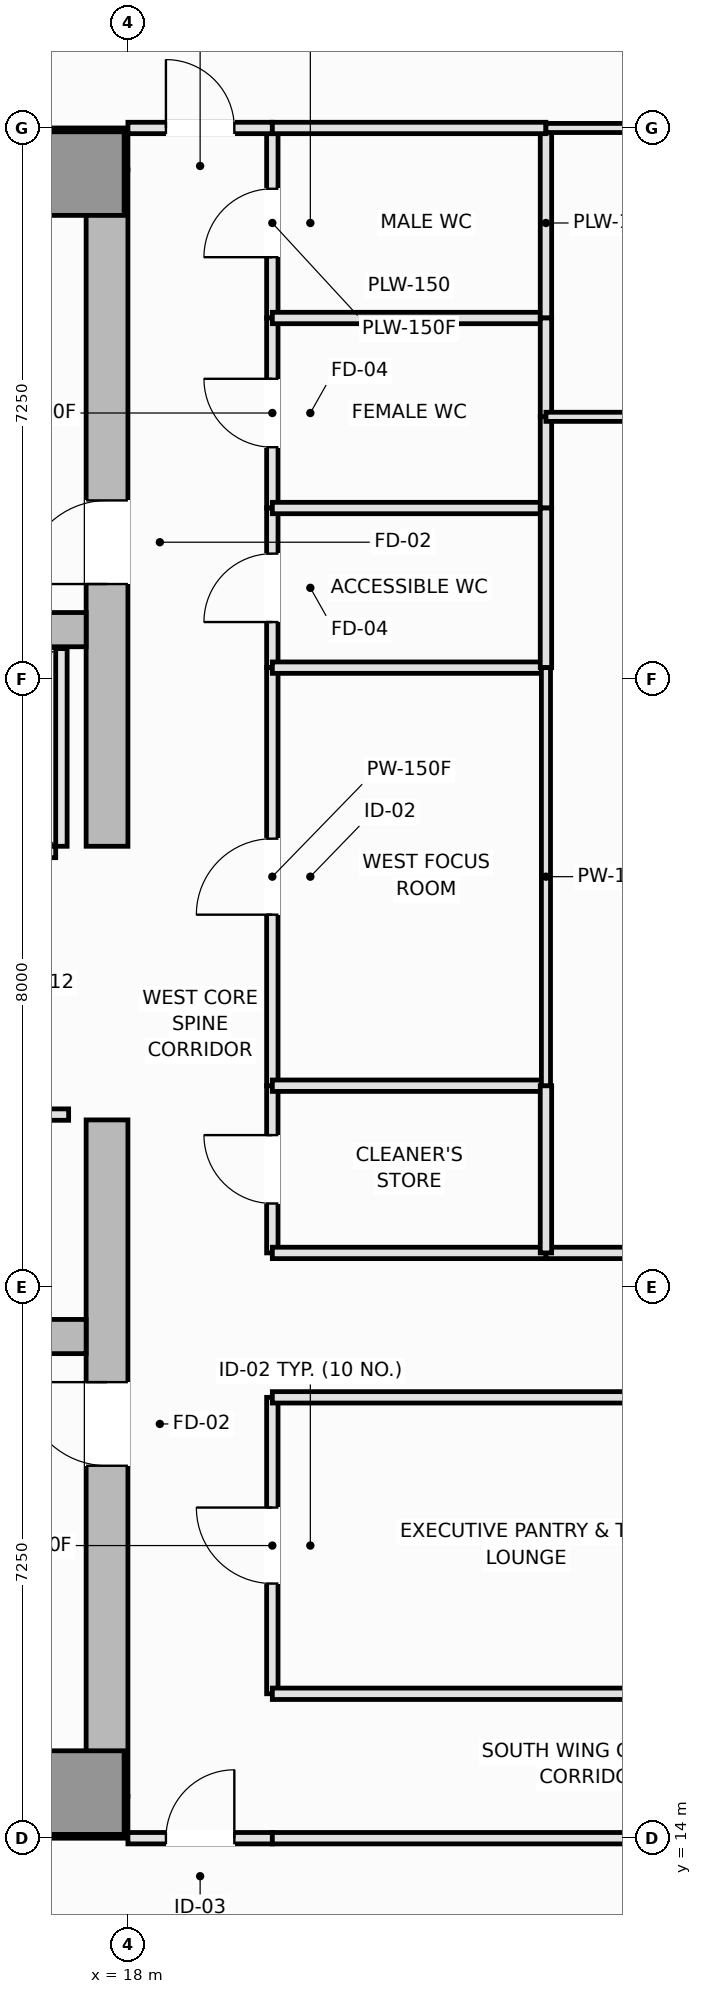
"""IFC4 building model, lengths in metres.
Left out: names, types, materials, properties, quantities, classifications, styles, units other than length and angle.
Written with IfcOpenShell. Run it as: python <this file> out.ifc"""

import sys

from ifc_helpers import new_model, si_unit, direction, frame, frame_2d, origin, origin_2d, place, context, subcontext, project, spatial, rectangle, extrude, element, fill, save


model = new_model("IFC4")
c1 = context("Model", 3, precision=1e-05, world=origin(), true_north=direction((0.0, 1.0)))
c2 = subcontext(c1, "Body", "Model", "MODEL_VIEW")
j1 = project(units=[si_unit("LENGTHUNIT", "METRE"), si_unit("PLANEANGLEUNIT", "RADIAN")], contexts=[c1])
p1 = place(None, origin())
s1 = spatial("IfcSite", under=j1, at=p1, CompositionType="ELEMENT")
p2 = place(p1, origin())
s2 = spatial("IfcBuilding", under=s1, at=p2, CompositionType="ELEMENT")
p3 = place(p2, frame((0.0, 0.0, 223.55)))
s3 = spatial("IfcBuildingStorey", under=s2, at=p3, CompositionType="ELEMENT", Elevation=223.55)
for number, where, z_axis, x_axis in (
    (1, (4.5, 14.275, 0.0), (0.0, 0.0, 1.0), (1.0, 0.0, 0.0)),
    (2, (4.5, 36.225, 0.0), (0.0, 0.0, 1.0), (1.0, 0.0, 0.0)),
):
    element("IfcWall", number, at=place(p3, frame(where, z_axis=z_axis, x_axis=x_axis)), inside=s3, PredefinedType="SHEAR", context=c2, shape_type="SweptSolid", body=[
        extrude(rectangle(XDim=13.5, YDim=0.55, at=frame_2d((6.75, 0.0))), origin(), (0.0, 0.0, 1.0), 3.55),
    ])
p4 = place(p3, frame((17.725, 14.55, 0.0), z_axis=(0.0, 0.0, 1.0), x_axis=(0.0, 1.0, 0.0)))
e3 = element("IfcWall", 3, at=p4, inside=s3, PredefinedType="SHEAR", context=c2, shape_type="SweptSolid", body=[
    extrude(rectangle(XDim=8.9, YDim=0.55, at=frame_2d((4.45, 0.0))), origin(), (0.0, 0.0, 1.0), 3.55),
])
p5 = place(p4, frame((4.35, 0.0, 0.0)))
e4 = element("IfcOpeningElement", 4, at=p5, cuts=e3, PredefinedType="OPENING", context=c2, shape_type="SweptSolid", body=[
    extrude(rectangle(XDim=1.1, YDim=2.15, at=frame_2d((0.55, 1.075))), frame((0.0, 0.285, 0.0), z_axis=(0.0, -1.0, 0.0), x_axis=(1.0, 0.0, 0.0)), (0.0, 0.0, 1.0), 0.57),
])
p6 = place(p3, frame((17.725, 27.05, 0.0), z_axis=(0.0, 0.0, 1.0), x_axis=(0.0, 1.0, 0.0)))
e5 = element("IfcWall", 5, at=p6, inside=s3, PredefinedType="SHEAR", context=c2, shape_type="SweptSolid", body=[
    extrude(rectangle(XDim=8.9, YDim=0.55, at=frame_2d((4.45, 0.0))), origin(), (0.0, 0.0, 1.0), 3.55),
])
p7 = place(p6, frame((3.45, 0.0, 0.0)))
e6 = element("IfcOpeningElement", 6, at=p7, cuts=e5, PredefinedType="OPENING", context=c2, shape_type="SweptSolid", body=[
    extrude(rectangle(XDim=1.1, YDim=2.15, at=frame_2d((0.55, 1.075))), frame((0.0, 0.285, 0.0), z_axis=(0.0, -1.0, 0.0), x_axis=(1.0, 0.0, 0.0)), (0.0, 0.0, 1.0), 0.57),
])
for number, where, z_axis, x_axis in (
    (7, (5.05, 20.6, 0.0), (0.0, 0.0, 1.0), (1.0, 0.0, 0.0)),
    (8, (5.05, 29.9, 0.0), (0.0, 0.0, 1.0), (1.0, 0.0, 0.0)),
):
    element("IfcWall", number, at=place(p3, frame(where, z_axis=z_axis, x_axis=x_axis)), inside=s3, PredefinedType="SHEAR", context=c2, shape_type="SweptSolid", body=[
        extrude(rectangle(XDim=12.4, YDim=0.45, at=frame_2d((6.2, 0.0))), origin(), (0.0, 0.0, 1.0), 3.55),
    ])
for number, where, z_axis, x_axis in (
    (9, (17.4, 14.6, 0.0), (0.0, 0.0, 1.0), (1.0, 0.0, 0.0)),
    (10, (17.4, 35.9, 0.0), (0.0, 0.0, 1.0), (1.0, 0.0, 0.0)),
):
    element("IfcColumn", number, at=place(p3, frame(where, z_axis=z_axis, x_axis=x_axis)), inside=s3, PredefinedType="PILASTER", context=c2, shape_type="SweptSolid", body=[
        extrude(rectangle(XDim=1.1, YDim=1.1, at=origin_2d()), origin(), (0.0, 0.0, 1.0), 3.55),
    ])
p8 = place(p3, frame((14.5, 26.975, 0.0), z_axis=(0.0, 0.0, 1.0), x_axis=(1.0, 0.0, 0.0)))
e11 = element("IfcWall", 11, at=p8, inside=s3, PredefinedType="PARTITIONING", context=c2, shape_type="SweptSolid", body=[
    extrude(rectangle(XDim=2.55, YDim=0.15, at=frame_2d((1.275, 0.0))), origin(), (0.0, 0.0, 1.0), 3.37),
])
p9 = place(p8, frame((0.625, 0.0, 0.0)))
e12 = element("IfcOpeningElement", 12, at=p9, cuts=e11, PredefinedType="OPENING", context=c2, shape_type="SweptSolid", body=[
    extrude(rectangle(XDim=1.3, YDim=2.2, at=frame_2d((0.65, 1.1))), frame((0.0, 0.085, 0.0), z_axis=(0.0, -1.0, 0.0), x_axis=(1.0, 0.0, 0.0)), (0.0, 0.0, 1.0), 0.17),
])
p10 = place(p3, frame((17.125, 27.05, 0.0), z_axis=(0.0, 0.0, 1.0), x_axis=(0.0, 1.0, 0.0)))
e13 = element("IfcWall", 13, at=p10, inside=s3, PredefinedType="PARTITIONING", context=c2, shape_type="SweptSolid", body=[
    extrude(rectangle(XDim=2.6, YDim=0.15, at=frame_2d((1.3, 0.0))), origin(), (0.0, 0.0, 1.0), 3.37),
])
p11 = place(p3, frame((14.33, 23.52, 0.0), z_axis=(0.0, 0.0, 1.0), x_axis=(1.0, 0.0, 0.0)))
e14 = element("IfcWall", 14, at=p11, inside=s3, PredefinedType="PARTITIONING", context=c2, shape_type="SweptSolid", body=[
    extrude(rectangle(XDim=2.89, YDim=0.15, at=frame_2d((1.445, 0.0))), origin(), (0.0, 0.0, 1.0), 3.37),
])
p12 = place(p11, frame((0.28, 0.0, 0.0)))
e15 = element("IfcOpeningElement", 15, at=p12, cuts=e14, PredefinedType="OPENING", context=c2, shape_type="SweptSolid", body=[
    extrude(rectangle(XDim=0.9, YDim=2.1, at=frame_2d((0.45, 1.05))), frame((0.0, 0.085, 0.0), z_axis=(0.0, -1.0, 0.0), x_axis=(1.0, 0.0, 0.0)), (0.0, 0.0, 1.0), 0.17),
])
p13 = place(p11, frame((1.71, 0.0, 0.0)))
e16 = element("IfcOpeningElement", 16, at=p13, cuts=e14, PredefinedType="OPENING", context=c2, shape_type="SweptSolid", body=[
    extrude(rectangle(XDim=0.9, YDim=2.1, at=frame_2d((0.45, 1.05))), frame((0.0, 0.085, 0.0), z_axis=(0.0, -1.0, 0.0), x_axis=(1.0, 0.0, 0.0)), (0.0, 0.0, 1.0), 0.17),
])
p14 = place(p3, frame((19.9, 15.9, 0.0), z_axis=(0.0, 0.0, 1.0), x_axis=(0.0, 1.0, 0.0)))
e17 = element("IfcWall", 17, at=p14, inside=s3, PredefinedType="PARTITIONING", context=c2, shape_type="SweptSolid", body=[
    extrude(rectangle(XDim=3.9, YDim=0.15, at=frame_2d((1.95, 0.0))), origin(), (0.0, 0.0, 1.0), 3.37),
])
p15 = place(p14, frame((1.45, 0.0, 0.0)))
e18 = element("IfcOpeningElement", 18, at=p15, cuts=e17, PredefinedType="OPENING", context=c2, shape_type="SweptSolid", body=[
    extrude(rectangle(XDim=1.0, YDim=2.15, at=frame_2d((0.5, 1.075))), frame((0.0, 0.085, 0.0), z_axis=(0.0, -1.0, 0.0), x_axis=(1.0, 0.0, 0.0)), (0.0, 0.0, 1.0), 0.17),
])
p16 = place(p3, frame((19.9, 34.0, 0.0), z_axis=(0.0, 0.0, 1.0), x_axis=(0.0, 1.0, 0.0)))
e19 = element("IfcWall", 19, at=p16, inside=s3, PredefinedType="PLUMBINGWALL", context=c2, shape_type="SweptSolid", body=[
    extrude(rectangle(XDim=2.5, YDim=0.15, at=frame_2d((1.25, 0.0))), origin(), (0.0, 0.0, 1.0), 3.37),
])
p17 = place(p16, frame((0.8, 0.0, 0.0)))
e20 = element("IfcOpeningElement", 20, at=p17, cuts=e19, PredefinedType="OPENING", context=c2, shape_type="SweptSolid", body=[
    extrude(rectangle(XDim=0.9, YDim=2.1, at=frame_2d((0.45, 1.05))), frame((0.0, 0.085, 0.0), z_axis=(0.0, -1.0, 0.0), x_axis=(1.0, 0.0, 0.0)), (0.0, 0.0, 1.0), 0.17),
])
p18 = place(p3, frame((19.9, 31.5, 0.0), z_axis=(0.0, 0.0, 1.0), x_axis=(0.0, 1.0, 0.0)))
e21 = element("IfcWall", 21, at=p18, inside=s3, PredefinedType="PLUMBINGWALL", context=c2, shape_type="SweptSolid", body=[
    extrude(rectangle(XDim=2.5, YDim=0.15, at=frame_2d((1.25, 0.0))), origin(), (0.0, 0.0, 1.0), 3.37),
])
p19 = place(p18, frame((0.8, 0.0, 0.0)))
e22 = element("IfcOpeningElement", 22, at=p19, cuts=e21, PredefinedType="OPENING", context=c2, shape_type="SweptSolid", body=[
    extrude(rectangle(XDim=0.9, YDim=2.1, at=frame_2d((0.45, 1.05))), frame((0.0, 0.085, 0.0), z_axis=(0.0, -1.0, 0.0), x_axis=(1.0, 0.0, 0.0)), (0.0, 0.0, 1.0), 0.17),
])
p20 = place(p3, frame((19.9, 29.4, 0.0), z_axis=(0.0, 0.0, 1.0), x_axis=(0.0, 1.0, 0.0)))
e23 = element("IfcWall", 23, at=p20, inside=s3, PredefinedType="PLUMBINGWALL", context=c2, shape_type="SweptSolid", body=[
    extrude(rectangle(XDim=2.1, YDim=0.15, at=frame_2d((1.05, 0.0))), origin(), (0.0, 0.0, 1.0), 3.37),
])
p21 = place(p20, frame((0.6, 0.0, 0.0)))
e24 = element("IfcOpeningElement", 24, at=p21, cuts=e23, PredefinedType="OPENING", context=c2, shape_type="SweptSolid", body=[
    extrude(rectangle(XDim=0.9, YDim=2.1, at=frame_2d((0.45, 1.05))), frame((0.0, 0.085, 0.0), z_axis=(0.0, -1.0, 0.0), x_axis=(1.0, 0.0, 0.0)), (0.0, 0.0, 1.0), 0.17),
])
p22 = place(p3, frame((19.9, 21.7, 0.0), z_axis=(0.0, 0.0, 1.0), x_axis=(0.0, 1.0, 0.0)))
e25 = element("IfcWall", 25, at=p22, inside=s3, PredefinedType="PLUMBINGWALL", context=c2, shape_type="SweptSolid", body=[
    extrude(rectangle(XDim=2.2, YDim=0.15, at=frame_2d((1.1, 0.0))), origin(), (0.0, 0.0, 1.0), 3.37),
])
p23 = place(p22, frame((0.65, 0.0, 0.0)))
e26 = element("IfcOpeningElement", 26, at=p23, cuts=e25, PredefinedType="OPENING", context=c2, shape_type="SweptSolid", body=[
    extrude(rectangle(XDim=0.9, YDim=2.1, at=frame_2d((0.45, 1.05))), frame((0.0, 0.085, 0.0), z_axis=(0.0, -1.0, 0.0), x_axis=(1.0, 0.0, 0.0)), (0.0, 0.0, 1.0), 0.17),
])
p24 = place(p3, frame((19.9, 23.9, 0.0), z_axis=(0.0, 0.0, 1.0), x_axis=(0.0, 1.0, 0.0)))
e27 = element("IfcWall", 27, at=p24, inside=s3, PredefinedType="PARTITIONING", context=c2, shape_type="SweptSolid", body=[
    extrude(rectangle(XDim=5.5, YDim=0.15, at=frame_2d((2.75, 0.0))), origin(), (0.0, 0.0, 1.0), 3.37),
])
p25 = place(p24, frame((2.25, 0.0, 0.0)))
e28 = element("IfcOpeningElement", 28, at=p25, cuts=e27, PredefinedType="OPENING", context=c2, shape_type="SweptSolid", body=[
    extrude(rectangle(XDim=1.0, YDim=2.15, at=frame_2d((0.5, 1.075))), frame((0.0, 0.085, 0.0), z_axis=(0.0, -1.0, 0.0), x_axis=(1.0, 0.0, 0.0)), (0.0, 0.0, 1.0), 0.17),
])
p26 = place(p3, frame((18.0, 14.0, 0.0), z_axis=(0.0, 0.0, 1.0), x_axis=(1.0, 0.0, 0.0)))
e29 = element("IfcWall", 29, at=p26, inside=s3, PredefinedType="PARTITIONING", context=c2, shape_type="SweptSolid", body=[
    extrude(rectangle(XDim=1.9, YDim=0.15, at=frame_2d((0.95, 0.0))), origin(), (0.0, 0.0, 1.0), 3.37),
])
p27 = place(p26, frame((0.5, 0.0, 0.0)))
e30 = element("IfcOpeningElement", 30, at=p27, cuts=e29, PredefinedType="OPENING", context=c2, shape_type="SweptSolid", body=[
    extrude(rectangle(XDim=0.9, YDim=2.1, at=frame_2d((0.45, 1.05))), frame((0.0, 0.085, 0.0), z_axis=(0.0, -1.0, 0.0), x_axis=(1.0, 0.0, 0.0)), (0.0, 0.0, 1.0), 0.17),
])
p28 = place(p3, frame((18.0, 36.5, 0.0), z_axis=(0.0, 0.0, 1.0), x_axis=(1.0, 0.0, 0.0)))
e31 = element("IfcWall", 31, at=p28, inside=s3, PredefinedType="PARTITIONING", context=c2, shape_type="SweptSolid", body=[
    extrude(rectangle(XDim=1.9, YDim=0.15, at=frame_2d((0.95, 0.0))), origin(), (0.0, 0.0, 1.0), 3.37),
])
p29 = place(p28, frame((0.5, 0.0, 0.0)))
e32 = element("IfcOpeningElement", 32, at=p29, cuts=e31, PredefinedType="OPENING", context=c2, shape_type="SweptSolid", body=[
    extrude(rectangle(XDim=0.9, YDim=2.1, at=frame_2d((0.45, 1.05))), frame((0.0, 0.085, 0.0), z_axis=(0.0, -1.0, 0.0), x_axis=(1.0, 0.0, 0.0)), (0.0, 0.0, 1.0), 0.17),
])
p30 = place(p3, frame((19.9, 19.8, 0.0), z_axis=(0.0, 0.0, 1.0), x_axis=(1.0, 0.0, 0.0)))
e33 = element("IfcWall", 33, at=p30, inside=s3, PredefinedType="PARTITIONING", context=c2, shape_type="SweptSolid", body=[
    extrude(rectangle(XDim=6.23, YDim=0.15, at=frame_2d((3.115, 0.0))), origin(), (0.0, 0.0, 1.0), 3.37),
])
p31 = place(p3, frame((19.9, 21.7, 0.0), z_axis=(0.0, 0.0, 1.0), x_axis=(1.0, 0.0, 0.0)))
e34 = element("IfcWall", 34, at=p31, inside=s3, PredefinedType="PLUMBINGWALL", context=c2, shape_type="SweptSolid", body=[
    extrude(rectangle(XDim=3.6, YDim=0.15, at=frame_2d((1.8, 0.0))), origin(), (0.0, 0.0, 1.0), 3.37),
])
p32 = place(p3, frame((23.5, 21.7, 0.0), z_axis=(0.0, 0.0, 1.0), x_axis=(1.0, 0.0, 0.0)))
e35 = element("IfcWall", 35, at=p32, inside=s3, PredefinedType="PARTITIONING", context=c2, shape_type="SweptSolid", body=[
    extrude(rectangle(XDim=12.8, YDim=0.15, at=frame_2d((6.4, 0.0))), origin(), (0.0, 0.0, 1.0), 3.37),
])
p33 = place(p32, frame((5.9, 0.0, 0.0)))
e36 = element("IfcOpeningElement", 36, at=p33, cuts=e35, PredefinedType="OPENING", context=c2, shape_type="SweptSolid", body=[
    extrude(rectangle(XDim=1.0, YDim=2.15, at=frame_2d((0.5, 1.075))), frame((0.0, 0.085, 0.0), z_axis=(0.0, -1.0, 0.0), x_axis=(1.0, 0.0, 0.0)), (0.0, 0.0, 1.0), 0.17),
])
p34 = place(p3, frame((19.9, 15.9, 0.0), z_axis=(0.0, 0.0, 1.0), x_axis=(1.0, 0.0, 0.0)))
e37 = element("IfcWall", 37, at=p34, inside=s3, PredefinedType="PARTITIONING", context=c2, shape_type="SweptSolid", body=[
    extrude(rectangle(XDim=6.23, YDim=0.15, at=frame_2d((3.115, 0.0))), origin(), (0.0, 0.0, 1.0), 3.37),
])
p35 = place(p3, frame((19.9, 14.0, 0.0), z_axis=(0.0, 0.0, 1.0), x_axis=(1.0, 0.0, 0.0)))
e38 = element("IfcWall", 38, at=p35, inside=s3, PredefinedType="PARTITIONING", context=c2, shape_type="SweptSolid", body=[
    extrude(rectangle(XDim=7.6, YDim=0.15, at=frame_2d((3.8, 0.0))), origin(), (0.0, 0.0, 1.0), 3.37),
])
p36 = place(p3, frame((19.9, 34.0, 0.0), z_axis=(0.0, 0.0, 1.0), x_axis=(1.0, 0.0, 0.0)))
e39 = element("IfcWall", 39, at=p36, inside=s3, PredefinedType="PLUMBINGWALL", context=c2, shape_type="SweptSolid", body=[
    extrude(rectangle(XDim=3.6, YDim=0.15, at=frame_2d((1.8, 0.0))), origin(), (0.0, 0.0, 1.0), 3.37),
])
p37 = place(p3, frame((23.5, 34.0, 0.0), z_axis=(0.0, 0.0, 1.0), x_axis=(0.0, 1.0, 0.0)))
e40 = element("IfcWall", 40, at=p37, inside=s3, PredefinedType="PLUMBINGWALL", context=c2, shape_type="SweptSolid", body=[
    extrude(rectangle(XDim=2.5, YDim=0.15, at=frame_2d((1.25, 0.0))), origin(), (0.0, 0.0, 1.0), 3.37),
])
for number, where, z_axis, x_axis in (
    (41, (19.9, 36.5, 0.0), (0.0, 0.0, 1.0), (1.0, 0.0, 0.0)),
    (42, (19.9, 31.5, 0.0), (0.0, 0.0, 1.0), (1.0, 0.0, 0.0)),
):
    element("IfcWall", number, at=place(p3, frame(where, z_axis=z_axis, x_axis=x_axis)), inside=s3, PredefinedType="PLUMBINGWALL", context=c2, shape_type="SweptSolid", body=[
        extrude(rectangle(XDim=3.6, YDim=0.15, at=frame_2d((1.8, 0.0))), origin(), (0.0, 0.0, 1.0), 3.37),
    ])
p38 = place(p3, frame((23.5, 32.7, 0.0), z_axis=(0.0, 0.0, 1.0), x_axis=(0.0, 1.0, 0.0)))
e43 = element("IfcWall", 43, at=p38, inside=s3, PredefinedType="PLUMBINGWALL", context=c2, shape_type="SweptSolid", body=[
    extrude(rectangle(XDim=1.3, YDim=0.15, at=frame_2d((0.65, 0.0))), origin(), (0.0, 0.0, 1.0), 3.37),
])
p39 = place(p3, frame((23.5, 31.5, 0.0), z_axis=(0.0, 0.0, 1.0), x_axis=(0.0, 1.0, 0.0)))
e44 = element("IfcWall", 44, at=p39, inside=s3, PredefinedType="PLUMBINGWALL", context=c2, shape_type="SweptSolid", body=[
    extrude(rectangle(XDim=1.2, YDim=0.15, at=frame_2d((0.6, 0.0))), origin(), (0.0, 0.0, 1.0), 3.37),
])
p40 = place(p3, frame((19.9, 29.4, 0.0), z_axis=(0.0, 0.0, 1.0), x_axis=(1.0, 0.0, 0.0)))
e45 = element("IfcWall", 45, at=p40, inside=s3, PredefinedType="PLUMBINGWALL", context=c2, shape_type="SweptSolid", body=[
    extrude(rectangle(XDim=3.6, YDim=0.15, at=frame_2d((1.8, 0.0))), origin(), (0.0, 0.0, 1.0), 3.37),
])
p41 = place(p3, frame((23.5, 29.4, 0.0), z_axis=(0.0, 0.0, 1.0), x_axis=(0.0, 1.0, 0.0)))
e46 = element("IfcWall", 46, at=p41, inside=s3, PredefinedType="PLUMBINGWALL", context=c2, shape_type="SweptSolid", body=[
    extrude(rectangle(XDim=2.1, YDim=0.15, at=frame_2d((1.05, 0.0))), origin(), (0.0, 0.0, 1.0), 3.37),
])
p42 = place(p3, frame((19.9, 23.9, 0.0), z_axis=(0.0, 0.0, 1.0), x_axis=(1.0, 0.0, 0.0)))
e47 = element("IfcWall", 47, at=p42, inside=s3, PredefinedType="PLUMBINGWALL", context=c2, shape_type="SweptSolid", body=[
    extrude(rectangle(XDim=3.6, YDim=0.15, at=frame_2d((1.8, 0.0))), origin(), (0.0, 0.0, 1.0), 3.37),
])
p43 = place(p3, frame((23.5, 21.7, 0.0), z_axis=(0.0, 0.0, 1.0), x_axis=(0.0, 1.0, 0.0)))
e48 = element("IfcWall", 48, at=p43, inside=s3, PredefinedType="PLUMBINGWALL", context=c2, shape_type="SweptSolid", body=[
    extrude(rectangle(XDim=2.2, YDim=0.15, at=frame_2d((1.1, 0.0))), origin(), (0.0, 0.0, 1.0), 3.37),
])
p44 = place(p3, frame((23.5, 23.9, 0.0), z_axis=(0.0, 0.0, 1.0), x_axis=(0.0, 1.0, 0.0)))
e49 = element("IfcWall", 49, at=p44, inside=s3, PredefinedType="PARTITIONING", context=c2, shape_type="SweptSolid", body=[
    extrude(rectangle(XDim=5.5, YDim=0.12, at=frame_2d((2.75, 0.0))), origin(), (0.0, 0.0, 1.0), 3.37),
])
for number, where, z_axis, x_axis in (
    (50, (23.5, 32.7, 0.0), (0.0, 0.0, 1.0), (1.0, 0.0, 0.0)),
    (51, (23.5, 36.5, 0.0), (0.0, 0.0, 1.0), (1.0, 0.0, 0.0)),
):
    element("IfcWall", number, at=place(p3, frame(where, z_axis=z_axis, x_axis=x_axis)), inside=s3, PredefinedType="PARTITIONING", context=c2, shape_type="SweptSolid", body=[
        extrude(rectangle(XDim=12.8, YDim=0.12, at=frame_2d((6.4, 0.0))), origin(), (0.0, 0.0, 1.0), 3.37),
    ])
p45 = place(p5, origin())
e52 = element("IfcDoor", 52, at=p45, inside=s3, OperationType="SINGLE_SWING_RIGHT", PredefinedType="DOOR", context=c2, shape_type="SweptSolid", body=[
    extrude(rectangle(XDim=1.1, YDim=2.15, at=frame_2d((0.55, 1.075))), frame((0.0, 0.025, 0.0), z_axis=(0.0, -1.0, 0.0), x_axis=(1.0, 0.0, 0.0)), (0.0, 0.0, 1.0), 0.05),
])
fill(e4, e52)
p46 = place(p7, origin())
e53 = element("IfcDoor", 53, at=p46, inside=s3, OperationType="SINGLE_SWING_LEFT", PredefinedType="DOOR", context=c2, shape_type="SweptSolid", body=[
    extrude(rectangle(XDim=1.1, YDim=2.15, at=frame_2d((0.55, 1.075))), frame((0.0, 0.025, 0.0), z_axis=(0.0, -1.0, 0.0), x_axis=(1.0, 0.0, 0.0)), (0.0, 0.0, 1.0), 0.05),
])
fill(e6, e53)
p47 = place(p15, origin())
e54 = element("IfcDoor", 54, at=p47, inside=s3, OperationType="SINGLE_SWING_RIGHT", PredefinedType="DOOR", context=c2, shape_type="SweptSolid", body=[
    extrude(rectangle(XDim=1.0, YDim=2.15, at=frame_2d((0.5, 1.075))), frame((0.0, 0.025, 0.0), z_axis=(0.0, -1.0, 0.0), x_axis=(1.0, 0.0, 0.0)), (0.0, 0.0, 1.0), 0.05),
])
fill(e18, e54)
p48 = place(p17, origin())
e55 = element("IfcDoor", 55, at=p48, inside=s3, OperationType="SINGLE_SWING_LEFT", PredefinedType="DOOR", context=c2, shape_type="SweptSolid", body=[
    extrude(rectangle(XDim=0.9, YDim=2.1, at=frame_2d((0.45, 1.05))), frame((0.0, 0.025, 0.0), z_axis=(0.0, -1.0, 0.0), x_axis=(1.0, 0.0, 0.0)), (0.0, 0.0, 1.0), 0.05),
])
fill(e20, e55)
p49 = place(p19, origin())
e56 = element("IfcDoor", 56, at=p49, inside=s3, OperationType="SINGLE_SWING_RIGHT", PredefinedType="DOOR", context=c2, shape_type="SweptSolid", body=[
    extrude(rectangle(XDim=0.9, YDim=2.1, at=frame_2d((0.45, 1.05))), frame((0.0, 0.025, 0.0), z_axis=(0.0, -1.0, 0.0), x_axis=(1.0, 0.0, 0.0)), (0.0, 0.0, 1.0), 0.05),
])
fill(e22, e56)
p50 = place(p21, origin())
e57 = element("IfcDoor", 57, at=p50, inside=s3, OperationType="SINGLE_SWING_LEFT", PredefinedType="DOOR", context=c2, shape_type="SweptSolid", body=[
    extrude(rectangle(XDim=0.9, YDim=2.1, at=frame_2d((0.45, 1.05))), frame((0.0, 0.025, 0.0), z_axis=(0.0, -1.0, 0.0), x_axis=(1.0, 0.0, 0.0)), (0.0, 0.0, 1.0), 0.05),
])
fill(e24, e57)
p51 = place(p23, origin())
e58 = element("IfcDoor", 58, at=p51, inside=s3, OperationType="SINGLE_SWING_RIGHT", PredefinedType="DOOR", context=c2, shape_type="SweptSolid", body=[
    extrude(rectangle(XDim=0.9, YDim=2.1, at=frame_2d((0.45, 1.05))), frame((0.0, 0.025, 0.0), z_axis=(0.0, -1.0, 0.0), x_axis=(1.0, 0.0, 0.0)), (0.0, 0.0, 1.0), 0.05),
])
fill(e26, e58)
p52 = place(p25, origin())
e59 = element("IfcDoor", 59, at=p52, inside=s3, OperationType="SINGLE_SWING_LEFT", PredefinedType="DOOR", context=c2, shape_type="SweptSolid", body=[
    extrude(rectangle(XDim=1.0, YDim=2.15, at=frame_2d((0.5, 1.075))), frame((0.0, 0.025, 0.0), z_axis=(0.0, -1.0, 0.0), x_axis=(1.0, 0.0, 0.0)), (0.0, 0.0, 1.0), 0.05),
])
fill(e28, e59)
p53 = place(p27, origin())
e60 = element("IfcDoor", 60, at=p53, inside=s3, OperationType="SINGLE_SWING_RIGHT", PredefinedType="DOOR", context=c2, shape_type="SweptSolid", body=[
    extrude(rectangle(XDim=0.9, YDim=2.1, at=frame_2d((0.45, 1.05))), frame((0.0, 0.025, 0.0), z_axis=(0.0, -1.0, 0.0), x_axis=(1.0, 0.0, 0.0)), (0.0, 0.0, 1.0), 0.05),
])
fill(e30, e60)
p54 = place(p29, origin())
e61 = element("IfcDoor", 61, at=p54, inside=s3, OperationType="SINGLE_SWING_LEFT", PredefinedType="DOOR", context=c2, shape_type="SweptSolid", body=[
    extrude(rectangle(XDim=0.9, YDim=2.1, at=frame_2d((0.45, 1.05))), frame((0.0, 0.025, 0.0), z_axis=(0.0, -1.0, 0.0), x_axis=(1.0, 0.0, 0.0)), (0.0, 0.0, 1.0), 0.05),
])
fill(e32, e61)
save(model, sys.argv[1])
